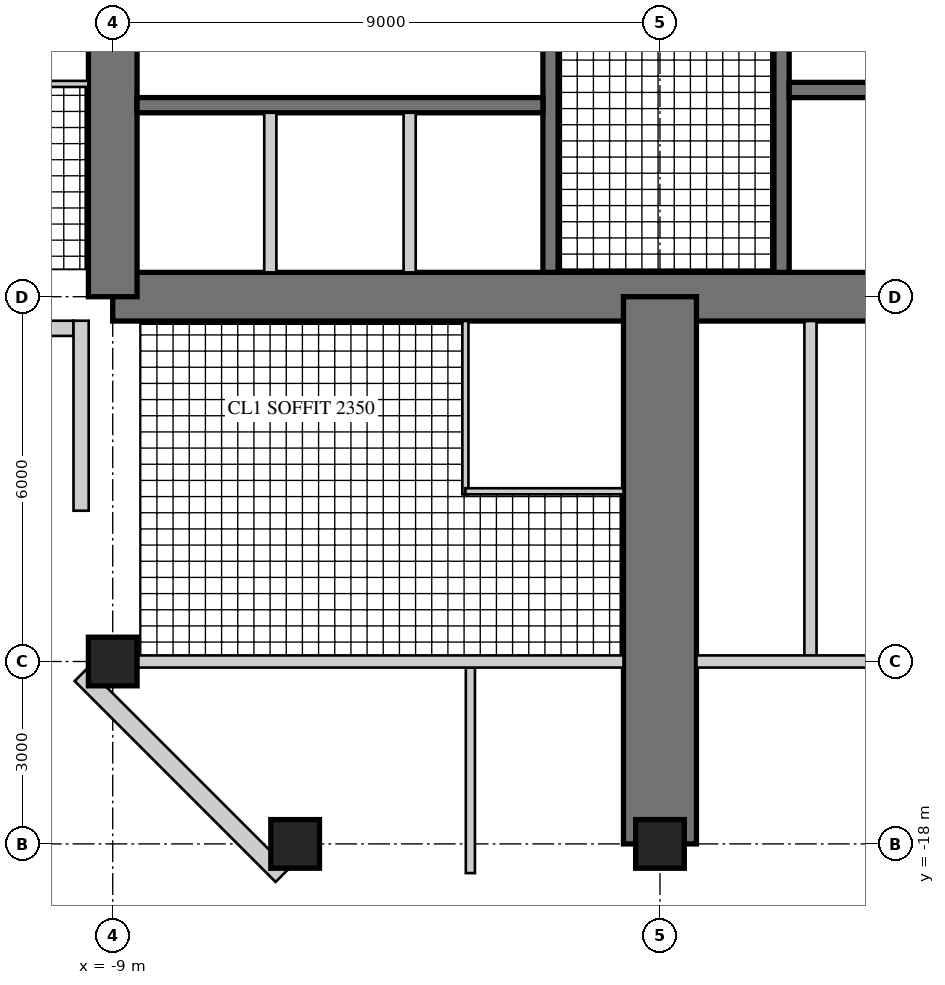
"""IFC4 building model, lengths in metres.
Left out: names, types, materials, properties, quantities, classifications, styles, units other than length and angle.
Written with IfcOpenShell. Run it as: python <this file> out.ifc"""

import sys

from ifc_helpers import new_model, si_unit, direction, frame, frame_2d, origin, origin_2d, place, context, subcontext, project, spatial, rectangle, hollow_rectangle, extrude, element, fill, save


model = new_model("IFC4")
c1 = context("Model", 3, precision=1e-05, world=origin(), true_north=direction((0.0, 1.0)))
c2 = subcontext(c1, "Body", "Model", "MODEL_VIEW")
j1 = project(units=[si_unit("LENGTHUNIT", "METRE"), si_unit("PLANEANGLEUNIT", "RADIAN")], contexts=[c1])
p1 = place(None, origin())
s1 = spatial("IfcSite", under=j1, at=p1, CompositionType="ELEMENT")
p2 = place(p1, origin())
s2 = spatial("IfcBuilding", under=s1, at=p2, CompositionType="ELEMENT")
p3 = place(p2, frame((0.0, 0.0, 242.5)))
s3 = spatial("IfcBuildingStorey", under=s2, at=p3, CompositionType="ELEMENT", Elevation=242.5)
p4 = place(p3, frame((-9.0, -9.0, 0.0), z_axis=(0.0, 0.0, 1.0), x_axis=(1.0, 0.0, 0.0)))
e1 = element("IfcWall", 1, at=p4, inside=s3, PredefinedType="SHEAR", context=c2, shape_type="SweptSolid", body=[
    extrude(rectangle(XDim=18.0, YDim=0.8, at=frame_2d((9.0, 0.0))), origin(), (0.0, 0.0, 1.0), 3.4),
])
p5 = place(p4, frame((9.8, 0.0, 0.0)))
e2 = element("IfcOpeningElement", 2, at=p5, cuts=e1, PredefinedType="OPENING", context=c2, shape_type="SweptSolid", body=[
    extrude(rectangle(XDim=1.0, YDim=2.4, at=frame_2d((0.5, 1.2))), frame((0.0, 0.41, 0.0), z_axis=(0.0, -1.0, 0.0), x_axis=(1.0, 0.0, 0.0)), (0.0, 0.0, 1.0), 0.82),
])
p6 = place(p3, frame((-9.0, 9.0, 0.0), z_axis=(0.0, 0.0, 1.0), x_axis=(0.0, -1.0, 0.0)))
e3 = element("IfcWall", 3, at=p6, inside=s3, PredefinedType="SHEAR", context=c2, shape_type="SweptSolid", body=[
    extrude(rectangle(XDim=18.0, YDim=0.8, at=frame_2d((9.0, 0.0))), origin(), (0.0, 0.0, 1.0), 3.4),
])
p7 = place(p6, frame((9.8, 0.0, 0.0)))
e4 = element("IfcOpeningElement", 4, at=p7, cuts=e3, PredefinedType="OPENING", context=c2, shape_type="SweptSolid", body=[
    extrude(rectangle(XDim=1.0, YDim=2.4, at=frame_2d((0.5, 1.2))), frame((0.0, 0.41, 0.0), z_axis=(0.0, -1.0, 0.0), x_axis=(1.0, 0.0, 0.0)), (0.0, 0.0, 1.0), 0.82),
])
p8 = place(p3, frame((-1.8, -1.875, 0.0), z_axis=(0.0, 0.0, 1.0), x_axis=(0.0, -1.0, 0.0)))
e5 = element("IfcWall", 5, at=p8, inside=s3, PredefinedType="SHEAR", context=c2, shape_type="SweptSolid", body=[
    extrude(rectangle(XDim=6.725, YDim=0.25, at=frame_2d((3.363, 0.0))), origin(), (0.0, 0.0, 1.0), 3.4),
])
p9 = place(p8, frame((1.875, 0.0, 0.0)))
e6 = element("IfcOpeningElement", 6, at=p9, cuts=e5, PredefinedType="OPENING", context=c2, shape_type="SweptSolid", body=[
    extrude(rectangle(XDim=1.6, YDim=2.4, at=frame_2d((0.8, 1.2))), frame((0.0, 0.135, 0.0), z_axis=(0.0, -1.0, 0.0), x_axis=(1.0, 0.0, 0.0)), (0.0, 0.0, 1.0), 0.27),
])
p10 = place(p3, frame((-1.925, -5.85, 0.0), z_axis=(0.0, 0.0, 1.0), x_axis=(-1.0, 0.0, 0.0)))
e7 = element("IfcWall", 7, at=p10, inside=s3, PredefinedType="SHEAR", context=c2, shape_type="SweptSolid", body=[
    extrude(rectangle(XDim=6.675, YDim=0.25, at=frame_2d((3.337, 0.0))), origin(), (0.0, 0.0, 1.0), 3.4),
])
p11 = place(p10, frame((0.496, 0.0, 0.0)))
e8 = element("IfcOpeningElement", 8, at=p11, cuts=e7, PredefinedType="OPENING", context=c2, shape_type="SweptSolid", body=[
    extrude(rectangle(XDim=1.1, YDim=2.2, at=frame_2d((0.55, 1.1))), frame((0.0, 0.135, 0.0), z_axis=(0.0, -1.0, 0.0), x_axis=(1.0, 0.0, 0.0)), (0.0, 0.0, 1.0), 0.27),
])
p12 = place(p10, frame((2.788, 0.0, 0.0)))
e9 = element("IfcOpeningElement", 9, at=p12, cuts=e7, PredefinedType="OPENING", context=c2, shape_type="SweptSolid", body=[
    extrude(rectangle(XDim=1.1, YDim=2.2, at=frame_2d((0.55, 1.1))), frame((0.0, 0.135, 0.0), z_axis=(0.0, -1.0, 0.0), x_axis=(1.0, 0.0, 0.0)), (0.0, 0.0, 1.0), 0.27),
])
p13 = place(p10, frame((5.079, 0.0, 0.0)))
e10 = element("IfcOpeningElement", 10, at=p13, cuts=e7, PredefinedType="OPENING", context=c2, shape_type="SweptSolid", body=[
    extrude(rectangle(XDim=1.1, YDim=2.2, at=frame_2d((0.55, 1.1))), frame((0.0, 0.135, 0.0), z_axis=(0.0, -1.0, 0.0), x_axis=(1.0, 0.0, 0.0)), (0.0, 0.0, 1.0), 0.27),
])
for number, where, z_axis, x_axis in (
    (11, (-4.117, -5.975, 0.0), (0.0, 0.0, 1.0), (0.0, -1.0, 0.0)),
    (12, (-6.408, -5.975, 0.0), (0.0, 0.0, 1.0), (0.0, -1.0, 0.0)),
):
    element("IfcWall", number, at=place(p3, frame(where, z_axis=z_axis, x_axis=x_axis)), inside=s3, PredefinedType="PARTITIONING", context=c2, shape_type="SweptSolid", body=[
        extrude(rectangle(XDim=2.625, YDim=0.2, at=frame_2d((1.312, 0.0))), origin(), (0.0, 0.0, 1.0), 3.4),
    ])
p14 = place(p3, frame((2.0, -1.675, 0.0), z_axis=(0.0, 0.0, 1.0), x_axis=(0.0, -1.0, 0.0)))
e13 = element("IfcWall", 13, at=p14, inside=s3, PredefinedType="SHEAR", context=c2, shape_type="SweptSolid", body=[
    extrude(rectangle(XDim=6.925, YDim=0.25, at=frame_2d((3.462, 0.0))), origin(), (0.0, 0.0, 1.0), 3.4),
])
p15 = place(p14, frame((0.725, 0.0, 0.0)))
e14 = element("IfcOpeningElement", 14, at=p15, cuts=e13, PredefinedType="OPENING", context=c2, shape_type="SweptSolid", body=[
    extrude(rectangle(XDim=1.0, YDim=2.1, at=frame_2d((0.5, 1.05))), frame((0.0, 0.135, 0.0), z_axis=(0.0, -1.0, 0.0), x_axis=(1.0, 0.0, 0.0)), (0.0, 0.0, 1.0), 0.27),
])
p16 = place(p3, frame((2.125, -5.6, 0.0), z_axis=(0.0, 0.0, 1.0), x_axis=(1.0, 0.0, 0.0)))
e15 = element("IfcWall", 15, at=p16, inside=s3, PredefinedType="SHEAR", context=c2, shape_type="SweptSolid", body=[
    extrude(rectangle(XDim=6.475, YDim=0.25, at=frame_2d((3.238, 0.0))), origin(), (0.0, 0.0, 1.0), 3.4),
])
p17 = place(p16, frame((0.175, 0.0, 0.0)))
e16 = element("IfcOpeningElement", 16, at=p17, cuts=e15, PredefinedType="OPENING", context=c2, shape_type="SweptSolid", body=[
    extrude(rectangle(XDim=1.0, YDim=2.1, at=frame_2d((0.5, 1.05))), frame((0.0, 0.135, 0.0), z_axis=(0.0, -1.0, 0.0), x_axis=(1.0, 0.0, 0.0)), (0.0, 0.0, 1.0), 0.27),
])
p18 = place(p3, frame((0.0, -9.0, 0.0), z_axis=(0.0, 0.0, 1.0), x_axis=(0.0, -1.0, 0.0)))
e17 = element("IfcWall", 17, at=p18, inside=s3, PredefinedType="SHEAR", context=c2, shape_type="SweptSolid", body=[
    extrude(rectangle(XDim=9.0, YDim=1.2, at=frame_2d((4.5, 0.0))), origin(), (0.0, 0.0, 1.0), 3.4),
])
p19 = place(p18, frame((3.8, 0.0, 0.0)))
e18 = element("IfcOpeningElement", 18, at=p19, cuts=e17, PredefinedType="OPENING", context=c2, shape_type="SweptSolid", body=[
    extrude(rectangle(XDim=1.0, YDim=2.15, at=frame_2d((0.5, 1.075))), frame((0.0, 0.61, 0.0), z_axis=(0.0, -1.0, 0.0), x_axis=(1.0, 0.0, 0.0)), (0.0, 0.0, 1.0), 1.22),
])
p20 = place(p18, frame((7.0, 0.0, 0.0)))
e19 = element("IfcOpeningElement", 19, at=p20, cuts=e17, PredefinedType="OPENING", context=c2, shape_type="SweptSolid", body=[
    extrude(rectangle(XDim=1.0, YDim=2.2, at=frame_2d((0.5, 1.1))), frame((0.0, 0.61, 0.0), z_axis=(0.0, -1.0, 0.0), x_axis=(1.0, 0.0, 0.0)), (0.0, 0.0, 1.0), 1.22),
])
for number, where, z_axis, x_axis in (
    (20, (-9.0, -15.0, 0.0), (0.0, 0.0, 1.0), (1.0, 0.0, 0.0)),
    (21, (-6.0, -18.0, 0.0), (0.0, 0.0, 1.0), (1.0, 0.0, 0.0)),
    (22, (0.0, -18.0, 0.0), (0.0, 0.0, 1.0), (1.0, 0.0, 0.0)),
):
    element("IfcColumn", number, at=place(p3, frame(where, z_axis=z_axis, x_axis=x_axis)), inside=s3, PredefinedType="COLUMN", context=c2, shape_type="SweptSolid", body=[
        extrude(rectangle(XDim=0.8, YDim=0.8, at=origin_2d()), origin(), (0.0, 0.0, 1.0), 3.4),
    ])
p21 = place(p3, frame((-12.52, -9.52, 0.0), z_axis=(0.0, 0.0, 1.0), x_axis=(1.0, 0.0, 0.0)))
e23 = element("IfcWall", 23, at=p21, inside=s3, PredefinedType="SOLIDWALL", context=c2, shape_type="SweptSolid", body=[
    extrude(rectangle(XDim=2.875, YDim=0.25, at=frame_2d((1.438, 0.0))), origin(), (0.0, 0.0, 1.0), 3.22),
])
p22 = place(p21, frame((0.6, 0.0, 0.0)))
e24 = element("IfcOpeningElement", 24, at=p22, cuts=e23, PredefinedType="OPENING", context=c2, shape_type="SweptSolid", body=[
    extrude(rectangle(XDim=1.0, YDim=2.2, at=frame_2d((0.5, 1.1))), frame((0.0, 0.135, 0.0), z_axis=(0.0, -1.0, 0.0), x_axis=(1.0, 0.0, 0.0)), (0.0, 0.0, 1.0), 0.27),
])
p23 = place(p3, frame((-9.52, -9.395, 0.0), z_axis=(0.0, 0.0, 1.0), x_axis=(0.0, -1.0, 0.0)))
e25 = element("IfcWall", 25, at=p23, inside=s3, PredefinedType="SOLIDWALL", context=c2, shape_type="SweptSolid", body=[
    extrude(rectangle(XDim=3.125, YDim=0.25, at=frame_2d((1.562, 0.0))), origin(), (0.0, 0.0, 1.0), 3.22),
])
p24 = place(p23, frame((0.6, 0.0, 0.0)))
e26 = element("IfcOpeningElement", 26, at=p24, cuts=e25, PredefinedType="OPENING", context=c2, shape_type="SweptSolid", body=[
    extrude(rectangle(XDim=1.0, YDim=2.2, at=frame_2d((0.5, 1.1))), frame((0.0, 0.135, 0.0), z_axis=(0.0, -1.0, 0.0), x_axis=(1.0, 0.0, 0.0)), (0.0, 0.0, 1.0), 0.27),
])
p25 = place(p3, frame((-9.52, -15.215, 0.0), z_axis=(0.0, 0.0, 1.0), x_axis=(0.707106781187, -0.707106781187, 0.0)))
e27 = element("IfcWall", 27, at=p25, inside=s3, PredefinedType="SOLIDWALL", context=c2, shape_type="SweptSolid", body=[
    extrude(rectangle(XDim=4.674, YDim=0.3, at=frame_2d((2.337, 0.0))), origin(), (0.0, 0.0, 1.0), 3.22),
])
p26 = place(p25, frame((1.887, 0.0, 0.3)))
e28 = element("IfcOpeningElement", 28, at=p26, cuts=e27, PredefinedType="OPENING", context=c2, shape_type="SweptSolid", body=[
    extrude(rectangle(XDim=0.9, YDim=2.4, at=frame_2d((0.45, 1.2))), frame((0.0, 0.16, 0.0), z_axis=(0.0, -1.0, 0.0), x_axis=(1.0, 0.0, 0.0)), (0.0, 0.0, 1.0), 0.32),
])
p27 = place(p3, frame((-3.2, -9.4, 0.0), z_axis=(0.0, 0.0, 1.0), x_axis=(0.0, -1.0, 0.0)))
e29 = element("IfcWall", 29, at=p27, inside=s3, PredefinedType="PARTITIONING", context=c2, shape_type="SweptSolid", body=[
    extrude(rectangle(XDim=2.85, YDim=0.1, at=frame_2d((1.425, 0.0))), origin(), (0.0, 0.0, 1.0), 3.22),
])
p28 = place(p3, frame((-3.2, -12.2, 0.0), z_axis=(0.0, 0.0, 1.0), x_axis=(1.0, 0.0, 0.0)))
e30 = element("IfcWall", 30, at=p28, inside=s3, PredefinedType="PARTITIONING", context=c2, shape_type="SweptSolid", body=[
    extrude(rectangle(XDim=2.6, YDim=0.1, at=frame_2d((1.3, 0.0))), origin(), (0.0, 0.0, 1.0), 3.22),
])
p29 = place(p28, frame((0.55, 0.0, 0.0)))
e31 = element("IfcOpeningElement", 31, at=p29, cuts=e30, PredefinedType="OPENING", context=c2, shape_type="SweptSolid", body=[
    extrude(rectangle(XDim=0.9, YDim=2.1, at=frame_2d((0.45, 1.05))), frame((0.0, 0.06, 0.0), z_axis=(0.0, -1.0, 0.0), x_axis=(1.0, 0.0, 0.0)), (0.0, 0.0, 1.0), 0.12),
])
p30 = place(p3, frame((2.475, -9.4, 0.0), z_axis=(0.0, 0.0, 1.0), x_axis=(0.0, -1.0, 0.0)))
e32 = element("IfcWall", 32, at=p30, inside=s3, PredefinedType="SOLIDWALL", context=c2, shape_type="SweptSolid", body=[
    extrude(rectangle(XDim=5.6, YDim=0.2, at=frame_2d((2.8, 0.0))), origin(), (0.0, 0.0, 1.0), 3.22),
])
p31 = place(p30, frame((1.2, 0.0, 0.0)))
e33 = element("IfcOpeningElement", 33, at=p31, cuts=e32, PredefinedType="OPENING", context=c2, shape_type="SweptSolid", body=[
    extrude(rectangle(XDim=1.0, YDim=2.2, at=frame_2d((0.5, 1.1))), frame((0.0, 0.11, 0.0), z_axis=(0.0, -1.0, 0.0), x_axis=(1.0, 0.0, 0.0)), (0.0, 0.0, 1.0), 0.22),
])
p32 = place(p3, frame((-3.118, -15.1, 0.0), z_axis=(0.0, 0.0, 1.0), x_axis=(0.0, -1.0, 0.0)))
e34 = element("IfcWall", 34, at=p32, inside=s3, PredefinedType="PARTITIONING", context=c2, shape_type="SweptSolid", body=[
    extrude(rectangle(XDim=3.38, YDim=0.15, at=frame_2d((1.69, 0.0))), origin(), (0.0, 0.0, 1.0), 3.22),
])
p33 = place(p32, frame((0.6, 0.0, 0.0)))
e35 = element("IfcOpeningElement", 35, at=p33, cuts=e34, PredefinedType="OPENING", context=c2, shape_type="SweptSolid", body=[
    extrude(rectangle(XDim=1.0, YDim=2.1, at=frame_2d((0.5, 1.05))), frame((0.0, 0.085, 0.0), z_axis=(0.0, -1.0, 0.0), x_axis=(1.0, 0.0, 0.0)), (0.0, 0.0, 1.0), 0.17),
])
p34 = place(p3, frame((-8.6, -15.0, 0.0), z_axis=(0.0, 0.0, 1.0), x_axis=(1.0, 0.0, 0.0)))
e36 = element("IfcWall", 36, at=p34, inside=s3, PredefinedType="SOLIDWALL", context=c2, shape_type="SweptSolid", body=[
    extrude(rectangle(XDim=8.0, YDim=0.2, at=frame_2d((4.0, 0.0))), origin(), (0.0, 0.0, 1.0), 2.52),
])
p35 = place(p3, frame((0.6, -15.0, 0.0), z_axis=(0.0, 0.0, 1.0), x_axis=(1.0, 0.0, 0.0)))
e37 = element("IfcWall", 37, at=p35, inside=s3, PredefinedType="SOLIDWALL", context=c2, shape_type="SweptSolid", body=[
    extrude(rectangle(XDim=8.0, YDim=0.2, at=frame_2d((4.0, 0.0))), origin(), (0.0, 0.0, 1.0), 2.52),
])
p36 = place(p35, frame((0.35, 0.0, 0.0)))
e38 = element("IfcOpeningElement", 38, at=p36, cuts=e37, PredefinedType="OPENING", context=c2, shape_type="SweptSolid", body=[
    extrude(rectangle(XDim=1.0, YDim=2.2, at=frame_2d((0.5, 1.1))), frame((0.0, 0.11, 0.0), z_axis=(0.0, -1.0, 0.0), x_axis=(1.0, 0.0, 0.0)), (0.0, 0.0, 1.0), 0.22),
])
p37 = place(p3, frame((-9.4, -5.5, 0.0), z_axis=(0.0, 0.0, 1.0), x_axis=(-1.0, 0.0, 0.0)))
e39 = element("IfcWall", 39, at=p37, inside=s3, PredefinedType="PARTITIONING", context=c2, shape_type="SweptSolid", body=[
    extrude(rectangle(XDim=2.85, YDim=0.1, at=frame_2d((1.425, 0.0))), origin(), (0.0, 0.0, 1.0), 3.22),
])
p38 = place(p24, origin())
e40 = element("IfcDoor", 40, at=p38, inside=s3, OperationType="SINGLE_SWING_LEFT", PredefinedType="DOOR", context=c2, shape_type="SweptSolid", body=[
    extrude(hollow_rectangle(XDim=1.0, YDim=2.2, WallThickness=0.06, at=frame_2d((0.5, 1.1))), frame((0.0, 0.025, 0.0), z_axis=(0.0, -1.0, 0.0), x_axis=(1.0, 0.0, 0.0)), (0.0, 0.0, 1.0), 0.05),
    extrude(rectangle(XDim=0.879, YDim=2.079, at=frame_2d((0.5, 1.1))), frame((0.0, 0.025, 0.0), z_axis=(0.0, -1.0, 0.0), x_axis=(1.0, 0.0, 0.0)), (0.0, 0.0, 1.0), 0.05),
])
fill(e26, e40)
p39 = place(p26, origin())
e41 = element("IfcWindow", 41, at=p39, inside=s3, PartitioningType="SINGLE_PANEL", PredefinedType="WINDOW", context=c2, shape_type="SweptSolid", body=[
    extrude(hollow_rectangle(XDim=0.9, YDim=2.4, WallThickness=0.06, at=frame_2d((0.45, 1.2))), frame((0.0, 0.03, 0.0), z_axis=(0.0, -1.0, 0.0), x_axis=(1.0, 0.0, 0.0)), (0.0, 0.0, 1.0), 0.06),
    extrude(rectangle(XDim=0.779, YDim=2.279, at=frame_2d((0.45, 1.2))), frame((0.0, 0.03, 0.0), z_axis=(0.0, -1.0, 0.0), x_axis=(1.0, 0.0, 0.0)), (0.0, 0.0, 1.0), 0.06),
])
fill(e28, e41)
p40 = place(p29, origin())
e42 = element("IfcDoor", 42, at=p40, inside=s3, OperationType="SINGLE_SWING_LEFT", PredefinedType="DOOR", context=c2, shape_type="SweptSolid", body=[
    extrude(rectangle(XDim=0.9, YDim=2.1, at=frame_2d((0.45, 1.05))), frame((0.0, 0.025, 0.0), z_axis=(0.0, -1.0, 0.0), x_axis=(1.0, 0.0, 0.0)), (0.0, 0.0, 1.0), 0.05),
])
fill(e31, e42)
p41 = place(p31, origin())
e43 = element("IfcDoor", 43, at=p41, inside=s3, OperationType="SINGLE_SWING_LEFT", PredefinedType="DOOR", context=c2, shape_type="SweptSolid", body=[
    extrude(rectangle(XDim=1.0, YDim=2.2, at=frame_2d((0.5, 1.1))), frame((0.0, 0.025, 0.0), z_axis=(0.0, -1.0, 0.0), x_axis=(1.0, 0.0, 0.0)), (0.0, 0.0, 1.0), 0.05),
])
fill(e33, e43)
p42 = place(p33, origin())
e44 = element("IfcDoor", 44, at=p42, inside=s3, OperationType="SINGLE_SWING_LEFT", PredefinedType="DOOR", context=c2, shape_type="SweptSolid", body=[
    extrude(rectangle(XDim=1.0, YDim=2.1, at=frame_2d((0.5, 1.05))), frame((0.0, 0.025, 0.0), z_axis=(0.0, -1.0, 0.0), x_axis=(1.0, 0.0, 0.0)), (0.0, 0.0, 1.0), 0.05),
])
fill(e35, e44)
p43 = place(p36, frame((1.0, 0.0, 0.0), z_axis=(0.0, 0.0, 1.0), x_axis=(-1.0, 0.0, 0.0)))
e45 = element("IfcDoor", 45, at=p43, inside=s3, OperationType="SINGLE_SWING_RIGHT", PredefinedType="DOOR", context=c2, shape_type="SweptSolid", body=[
    extrude(rectangle(XDim=1.0, YDim=2.2, at=frame_2d((0.5, 1.1))), frame((0.0, 0.025, 0.0), z_axis=(0.0, -1.0, 0.0), x_axis=(1.0, 0.0, 0.0)), (0.0, 0.0, 1.0), 0.05),
])
fill(e38, e45)
p44 = place(p19, frame((1.0, 0.0, 0.0), z_axis=(0.0, 0.0, 1.0), x_axis=(-1.0, 0.0, 0.0)))
e46 = element("IfcDoor", 46, at=p44, inside=s3, OperationType="SINGLE_SWING_RIGHT", PredefinedType="DOOR", context=c2, shape_type="SweptSolid", body=[
    extrude(rectangle(XDim=1.0, YDim=2.15, at=frame_2d((0.5, 1.075))), frame((0.0, 0.025, 0.0), z_axis=(0.0, -1.0, 0.0), x_axis=(1.0, 0.0, 0.0)), (0.0, 0.0, 1.0), 0.05),
])
fill(e18, e46)
p45 = place(p20, frame((1.0, 0.0, 0.0), z_axis=(0.0, 0.0, 1.0), x_axis=(-1.0, 0.0, 0.0)))
e47 = element("IfcDoor", 47, at=p45, inside=s3, OperationType="SINGLE_SWING_RIGHT", PredefinedType="DOOR", context=c2, shape_type="SweptSolid", body=[
    extrude(rectangle(XDim=1.0, YDim=2.2, at=frame_2d((0.5, 1.1))), frame((0.0, 0.025, 0.0), z_axis=(0.0, -1.0, 0.0), x_axis=(1.0, 0.0, 0.0)), (0.0, 0.0, 1.0), 0.05),
])
fill(e19, e47)
p46 = place(p5, origin())
e48 = element("IfcDoor", 48, at=p46, inside=s3, OperationType="SINGLE_SWING_RIGHT", PredefinedType="DOOR", context=c2, shape_type="SweptSolid", body=[
    extrude(rectangle(XDim=1.0, YDim=2.4, at=frame_2d((0.5, 1.2))), frame((0.0, 0.055, 0.0), z_axis=(0.0, -1.0, 0.0), x_axis=(1.0, 0.0, 0.0)), (0.0, 0.0, 1.0), 0.05),
])
fill(e2, e48)
p47 = place(p11, origin())
e49 = element("IfcDoor", 49, at=p47, inside=s3, OperationType="DOUBLE_DOOR_SLIDING", PredefinedType="DOOR", context=c2, shape_type="SweptSolid", body=[
    extrude(rectangle(XDim=1.1, YDim=2.2, at=frame_2d((0.55, 1.1))), frame((0.0, 0.025, 0.0), z_axis=(0.0, -1.0, 0.0), x_axis=(1.0, 0.0, 0.0)), (0.0, 0.0, 1.0), 0.05),
])
fill(e8, e49)
p48 = place(p12, origin())
e50 = element("IfcDoor", 50, at=p48, inside=s3, OperationType="DOUBLE_DOOR_SLIDING", PredefinedType="DOOR", context=c2, shape_type="SweptSolid", body=[
    extrude(rectangle(XDim=1.1, YDim=2.2, at=frame_2d((0.55, 1.1))), frame((0.0, 0.025, 0.0), z_axis=(0.0, -1.0, 0.0), x_axis=(1.0, 0.0, 0.0)), (0.0, 0.0, 1.0), 0.05),
])
fill(e9, e50)
p49 = place(p13, origin())
e51 = element("IfcDoor", 51, at=p49, inside=s3, OperationType="DOUBLE_DOOR_SLIDING", PredefinedType="DOOR", context=c2, shape_type="SweptSolid", body=[
    extrude(rectangle(XDim=1.1, YDim=2.2, at=frame_2d((0.55, 1.1))), frame((0.0, 0.025, 0.0), z_axis=(0.0, -1.0, 0.0), x_axis=(1.0, 0.0, 0.0)), (0.0, 0.0, 1.0), 0.05),
])
fill(e10, e51)
p50 = place(p9, origin())
e52 = element("IfcDoor", 52, at=p50, inside=s3, OperationType="DOUBLE_DOOR_DOUBLE_SWING", PredefinedType="DOOR", context=c2, shape_type="SweptSolid", body=[
    extrude(rectangle(XDim=1.6, YDim=2.4, at=frame_2d((0.8, 1.2))), frame((0.0, 0.025, 0.0), z_axis=(0.0, -1.0, 0.0), x_axis=(1.0, 0.0, 0.0)), (0.0, 0.0, 1.0), 0.05),
])
fill(e6, e52)
p51 = place(p17, frame((1.0, 0.0, 0.0), z_axis=(0.0, 0.0, 1.0), x_axis=(-1.0, 0.0, 0.0)))
e53 = element("IfcDoor", 53, at=p51, inside=s3, OperationType="SINGLE_SWING_RIGHT", PredefinedType="DOOR", context=c2, shape_type="SweptSolid", body=[
    extrude(rectangle(XDim=1.0, YDim=2.1, at=frame_2d((0.5, 1.05))), frame((0.0, 0.025, 0.0), z_axis=(0.0, -1.0, 0.0), x_axis=(1.0, 0.0, 0.0)), (0.0, 0.0, 1.0), 0.05),
])
fill(e16, e53)
save(model, sys.argv[1])
